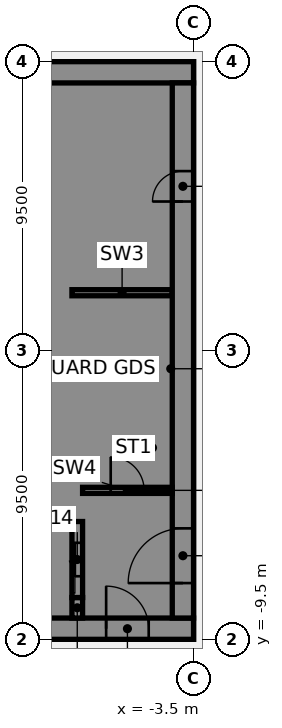
"""IFC4 building model, lengths in metres.
Left out: names, types, materials, properties, quantities, classifications, styles, units other than length and angle.
Written with IfcOpenShell. Run it as: python <this file> out.ifc"""

import sys

from ifc_helpers import new_model, si_unit, direction, frame, frame_2d, origin, place, context, subcontext, project, spatial, polyline, rectangle, outline, extrude, element, fill, save


model = new_model("IFC4")
c1 = context("Model", 3, precision=1e-05, world=origin(), true_north=direction((0.0, 1.0)))
c2 = subcontext(c1, "Body", "Model", "MODEL_VIEW")
j1 = project(units=[si_unit("LENGTHUNIT", "METRE"), si_unit("PLANEANGLEUNIT", "RADIAN")], contexts=[c1])
p1 = place(None, origin())
s1 = spatial("IfcSite", under=j1, at=p1, CompositionType="ELEMENT")
p2 = place(p1, origin())
s2 = spatial("IfcBuilding", under=s1, at=p2, CompositionType="ELEMENT")
p3 = place(p2, frame((0.0, 0.0, 64.0)))
s3 = spatial("IfcBuildingStorey", under=s2, at=p3, CompositionType="ELEMENT", Elevation=64.0)
p4 = place(p3, frame((-16.5, -9.15, 0.0), z_axis=(0.0, 0.0, 1.0), x_axis=(1.0, 0.0, 0.0)))
e1 = element("IfcWall", 1, at=p4, inside=s3, PredefinedType="SHEAR", context=c2, shape_type="SweptSolid", body=[
    extrude(rectangle(XDim=13.0, YDim=0.7, at=frame_2d((6.5, 0.0))), origin(), (0.0, 0.0, 1.0), 3.61),
])
p5 = place(p4, frame((4.15, 0.0, 0.0)))
e2 = element("IfcOpeningElement", 2, at=p5, cuts=e1, PredefinedType="OPENING", context=c2, shape_type="SweptSolid", body=[
    extrude(rectangle(XDim=1.4, YDim=2.1, at=frame_2d((0.7, 1.05))), frame((0.0, 0.36, 0.0), z_axis=(0.0, -1.0, 0.0), x_axis=(1.0, 0.0, 0.0)), (0.0, 0.0, 1.0), 0.72),
])
p6 = place(p4, frame((10.125, 0.0, 0.0)))
e3 = element("IfcOpeningElement", 3, at=p6, cuts=e1, PredefinedType="OPENING", context=c2, shape_type="SweptSolid", body=[
    extrude(rectangle(XDim=1.4, YDim=2.1, at=frame_2d((0.7, 1.05))), frame((0.0, 0.36, 0.0), z_axis=(0.0, -1.0, 0.0), x_axis=(1.0, 0.0, 0.0)), (0.0, 0.0, 1.0), 0.72),
])
p7 = place(p3, frame((-16.5, 9.15, 0.0), z_axis=(0.0, 0.0, 1.0), x_axis=(1.0, 0.0, 0.0)))
e4 = element("IfcWall", 4, at=p7, inside=s3, PredefinedType="SHEAR", context=c2, shape_type="SweptSolid", body=[
    extrude(rectangle(XDim=13.0, YDim=0.7, at=frame_2d((6.5, 0.0))), origin(), (0.0, 0.0, 1.0), 3.61),
])
p8 = place(p3, origin())
e5 = element("IfcWall", 5, at=p8, inside=s3, PredefinedType="SHEAR", context=c2, shape_type="SweptSolid", body=[
    extrude(outline(polyline([(-9.8, -5.375), (-9.8, -5.625), (-7.5, -5.625), (-7.15, -5.625), (-7.15, 8.8), (-7.5, 8.8), (-9.8, 8.8), (-9.8, 8.125), (-7.5, 8.125), (-7.5, 5.625), (-9.8, 5.625), (-9.8, 5.375), (-7.5, 5.375), (-7.5, 2.875), (-9.8, 2.875), (-9.8, 2.625), (-7.5, 2.625), (-7.5, 0.125), (-9.8, 0.125), (-9.8, -0.125), (-7.5, -0.125), (-7.5, -2.625), (-9.8, -2.625), (-9.8, -2.875), (-7.5, -2.875), (-7.5, -5.375), (-9.8, -5.375)])), origin(), (0.0, 0.0, 1.0), 3.61),
])
p9 = place(p3, origin())
e6 = element("IfcWall", 6, at=p9, inside=s3, PredefinedType="SHEAR", context=c2, shape_type="SweptSolid", body=[
    extrude(outline(polyline([(-7.5, -8.125), (-9.55, -8.125), (-9.55, -5.625), (-9.8, -5.625), (-9.8, -8.125), (-9.8, -8.8), (-7.5, -8.8), (-7.5, -8.125)])), origin(), (0.0, 0.0, 1.0), 3.61),
])
p10 = place(p3, frame((-7.325, -8.8, 0.0), z_axis=(0.0, 0.0, 1.0), x_axis=(0.0, 1.0, 0.0)))
e7 = element("IfcWall", 7, at=p10, inside=s3, PredefinedType="SHEAR", context=c2, shape_type="SweptSolid", body=[
    extrude(rectangle(XDim=0.675, YDim=0.35, at=frame_2d((0.337, 0.0))), origin(), (0.0, 0.0, 1.0), 3.61),
])
p11 = place(p3, frame((-7.5, 1.9, 0.0), z_axis=(0.0, 0.0, 1.0), x_axis=(1.0, 0.0, 0.0)))
e8 = element("IfcWall", 8, at=p11, inside=s3, PredefinedType="SHEAR", context=c2, shape_type="SweptSolid", body=[
    extrude(rectangle(XDim=3.3, YDim=0.2, at=frame_2d((1.65, 0.0))), origin(), (0.0, 0.0, 1.0), 3.61),
])
p12 = place(p3, frame((-7.325, -8.125, 0.0), z_axis=(0.0, 0.0, 1.0), x_axis=(0.0, 1.0, 0.0)))
e9 = element("IfcWall", 9, at=p12, inside=s3, PredefinedType="SHEAR", context=c2, shape_type="SweptSolid", body=[
    extrude(rectangle(XDim=2.5, YDim=0.35, at=frame_2d((1.25, 0.0))), origin(), (0.0, 0.0, 1.0), 3.61),
])
p13 = place(p12, frame((0.7, 0.0, 0.0)))
e10 = element("IfcOpeningElement", 10, at=p13, cuts=e9, PredefinedType="OPENING", context=c2, shape_type="SweptSolid", body=[
    extrude(rectangle(XDim=1.1, YDim=2.1, at=frame_2d((0.55, 1.05))), frame((0.0, 0.185, 0.0), z_axis=(0.0, -1.0, 0.0), x_axis=(1.0, 0.0, 0.0)), (0.0, 0.0, 1.0), 0.37),
])
p14 = place(p3, frame((-3.85, -8.8, 0.0), z_axis=(0.0, 0.0, 1.0), x_axis=(0.0, 1.0, 0.0)))
e11 = element("IfcWall", 11, at=p14, inside=s3, PredefinedType="SHEAR", context=c2, shape_type="SweptSolid", body=[
    extrude(rectangle(XDim=17.6, YDim=0.7, at=frame_2d((8.8, 0.0))), origin(), (0.0, 0.0, 1.0), 3.61),
])
p15 = place(p14, frame((1.15, 0.0, 0.0)))
e12 = element("IfcOpeningElement", 12, at=p15, cuts=e11, PredefinedType="OPENING", context=c2, shape_type="SweptSolid", body=[
    extrude(rectangle(XDim=1.8, YDim=2.1, at=frame_2d((0.9, 1.05))), frame((0.0, 0.36, 0.0), z_axis=(0.0, -1.0, 0.0), x_axis=(1.0, 0.0, 0.0)), (0.0, 0.0, 1.0), 0.72),
])
p16 = place(p14, frame((13.7, 0.0, 0.0)))
e13 = element("IfcOpeningElement", 13, at=p16, cuts=e11, PredefinedType="OPENING", context=c2, shape_type="SweptSolid", body=[
    extrude(rectangle(XDim=1.0, YDim=2.1, at=frame_2d((0.5, 1.05))), frame((0.0, 0.36, 0.0), z_axis=(0.0, -1.0, 0.0), x_axis=(1.0, 0.0, 0.0)), (0.0, 0.0, 1.0), 0.72),
])
p17 = place(p3, frame((-7.15, -4.6, 0.0), z_axis=(0.0, 0.0, 1.0), x_axis=(1.0, 0.0, 0.0)))
e14 = element("IfcWall", 14, at=p17, inside=s3, PredefinedType="SHEAR", context=c2, shape_type="SweptSolid", body=[
    extrude(rectangle(XDim=2.95, YDim=0.2, at=frame_2d((1.475, 0.0))), origin(), (0.0, 0.0, 1.0), 3.61),
])
p18 = place(p17, frame((0.925, 0.0, 0.0)))
e15 = element("IfcOpeningElement", 15, at=p18, cuts=e14, PredefinedType="OPENING", context=c2, shape_type="SweptSolid", body=[
    extrude(rectangle(XDim=1.1, YDim=2.1, at=frame_2d((0.55, 1.05))), frame((0.0, 0.11, 0.0), z_axis=(0.0, -1.0, 0.0), x_axis=(1.0, 0.0, 0.0)), (0.0, 0.0, 1.0), 0.22),
])
p19 = place(p6, origin())
e16 = element("IfcDoor", 16, at=p19, inside=s3, OperationType="SINGLE_SWING_LEFT", PredefinedType="DOOR", context=c2, shape_type="SweptSolid", body=[
    extrude(rectangle(XDim=1.4, YDim=2.1, at=frame_2d((0.7, 1.05))), frame((0.0, 0.025, 0.0), z_axis=(0.0, -1.0, 0.0), x_axis=(1.0, 0.0, 0.0)), (0.0, 0.0, 1.0), 0.05),
])
fill(e3, e16)
p20 = place(p15, origin())
e17 = element("IfcDoor", 17, at=p20, inside=s3, OperationType="SINGLE_SWING_LEFT", PredefinedType="DOOR", context=c2, shape_type="SweptSolid", body=[
    extrude(rectangle(XDim=1.8, YDim=2.1, at=frame_2d((0.9, 1.05))), frame((0.0, 0.025, 0.0), z_axis=(0.0, -1.0, 0.0), x_axis=(1.0, 0.0, 0.0)), (0.0, 0.0, 1.0), 0.05),
])
fill(e12, e17)
p21 = place(p16, origin())
e18 = element("IfcDoor", 18, at=p21, inside=s3, OperationType="SINGLE_SWING_LEFT", PredefinedType="DOOR", context=c2, shape_type="SweptSolid", body=[
    extrude(rectangle(XDim=1.0, YDim=2.1, at=frame_2d((0.5, 1.05))), frame((0.0, 0.025, 0.0), z_axis=(0.0, -1.0, 0.0), x_axis=(1.0, 0.0, 0.0)), (0.0, 0.0, 1.0), 0.05),
])
fill(e13, e18)
p22 = place(p18, origin())
e19 = element("IfcDoor", 19, at=p22, inside=s3, OperationType="SINGLE_SWING_LEFT", PredefinedType="DOOR", context=c2, shape_type="SweptSolid", body=[
    extrude(rectangle(XDim=1.1, YDim=2.1, at=frame_2d((0.55, 1.05))), frame((0.0, 0.025, 0.0), z_axis=(0.0, -1.0, 0.0), x_axis=(1.0, 0.0, 0.0)), (0.0, 0.0, 1.0), 0.05),
])
fill(e15, e19)
p23 = place(p13, origin())
e20 = element("IfcDoor", 20, at=p23, inside=s3, OperationType="SLIDING_TO_LEFT", PredefinedType="DOOR", context=c2, shape_type="SweptSolid", body=[
    extrude(rectangle(XDim=1.1, YDim=2.1, at=frame_2d((0.55, 1.05))), frame((0.0, 0.025, 0.0), z_axis=(0.0, -1.0, 0.0), x_axis=(1.0, 0.0, 0.0)), (0.0, 0.0, 1.0), 0.05),
])
fill(e10, e20)
save(model, sys.argv[1])
